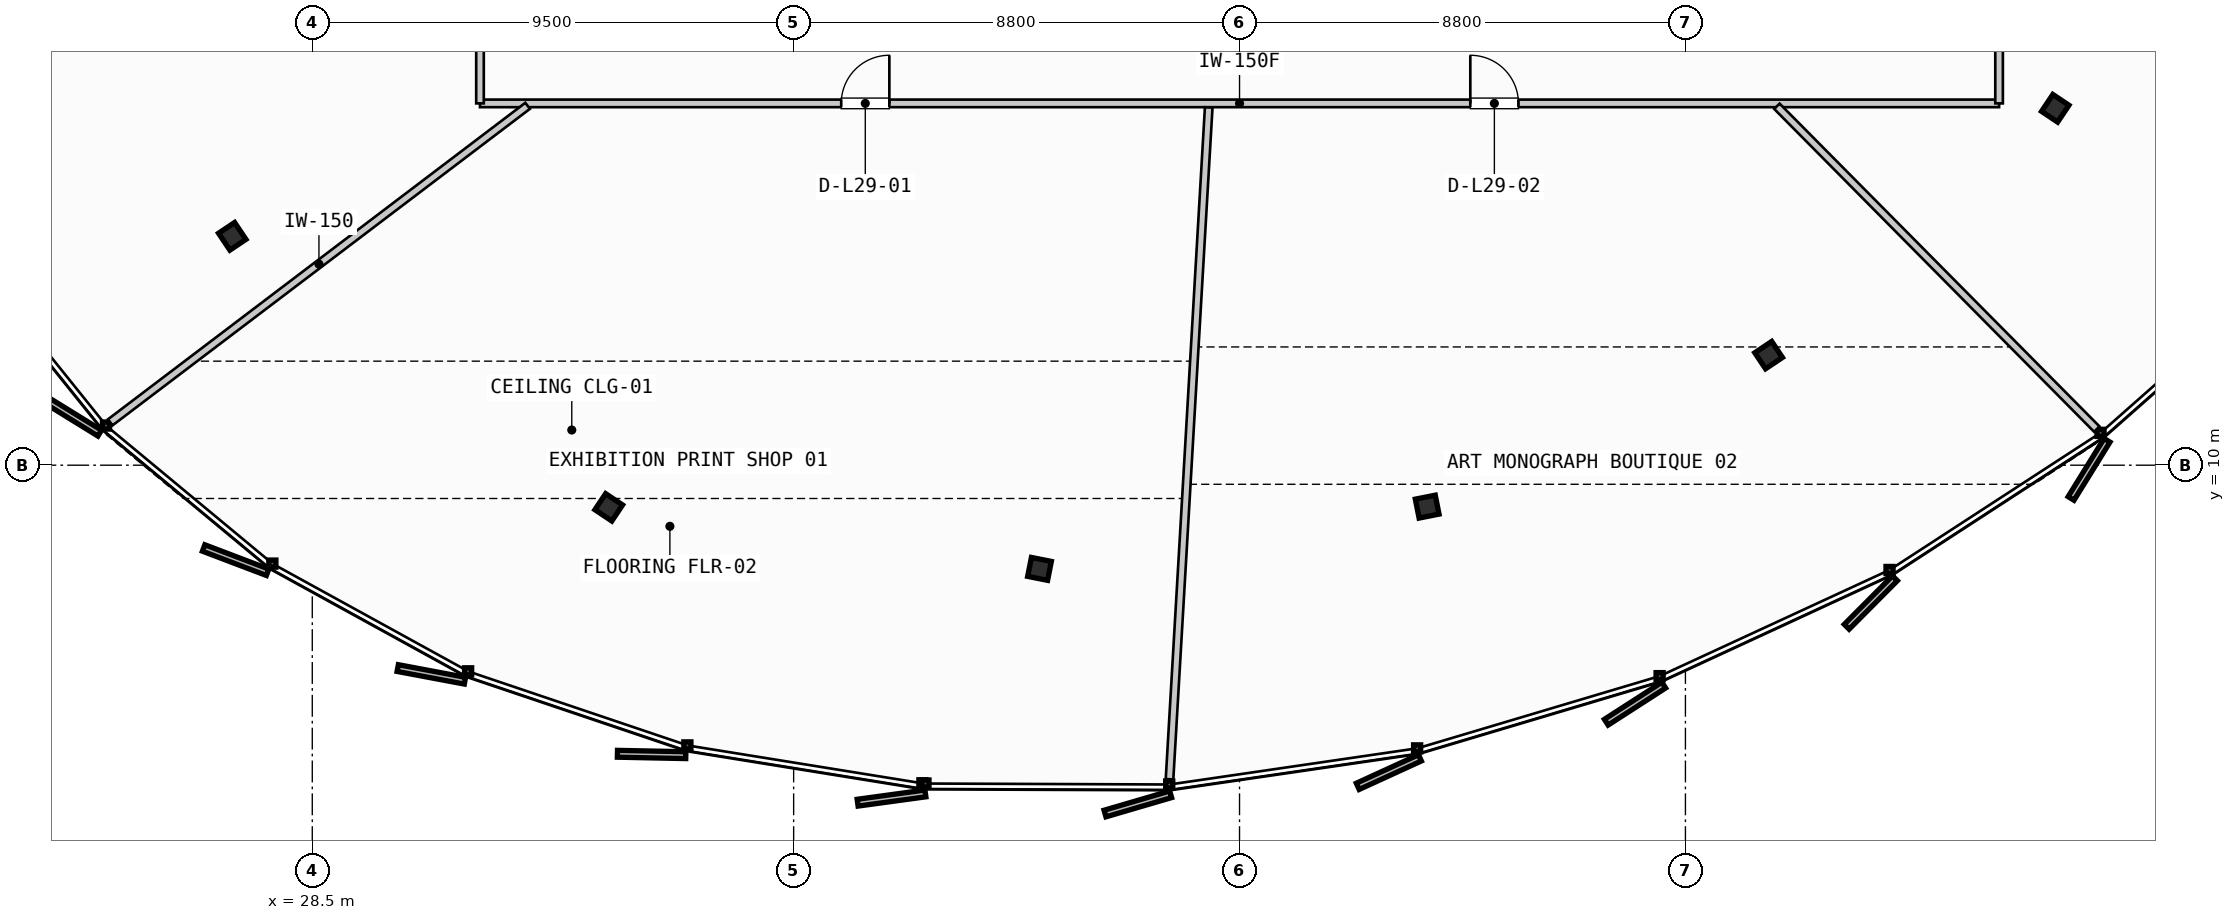
"""IFC4 building model, lengths in metres.
Left out: names, types, materials, properties, quantities, classifications, styles, units other than length and angle.
Written with IfcOpenShell. Run it as: python <this file> out.ifc"""

import sys

from ifc_helpers import new_model, si_unit, direction, frame, frame_2d, origin, origin_2d, place, context, subcontext, project, spatial, rectangle, i_section, extrude, source, transform, mapped, element, fill, save


model = new_model("IFC4")
c1 = context("Model", 3, precision=1e-05, world=origin(), true_north=direction((0.0, 1.0)))
c2 = subcontext(c1, "Body", "Model", "MODEL_VIEW")
j1 = project(units=[si_unit("LENGTHUNIT", "METRE"), si_unit("PLANEANGLEUNIT", "RADIAN")], contexts=[c1])
p1 = place(None, origin())
s1 = spatial("IfcSite", under=j1, at=p1, CompositionType="ELEMENT")
p2 = place(p1, origin())
s2 = spatial("IfcBuilding", under=s1, at=p2, CompositionType="ELEMENT")
p3 = place(p2, frame((0.0, 0.0, 118.0)))
s3 = spatial("IfcBuildingStorey", under=s2, at=p3, CompositionType="ELEMENT", Elevation=118.0)
m1 = source(origin(), c2, "Body", "SweptSolid", [
    extrude(i_section(OverallWidth=0.401, OverallDepth=0.381, WebThickness=0.032, FlangeThickness=0.051, FilletRadius=0.015, at=origin_2d()), origin(), (0.0, 0.0, 1.0), 3.35),
])
for number, where, z_axis, x_axis in (
    (1, (26.921, 14.517, 0.0), (0.0, 0.0, 1.0), (-0.831, -0.556, 0.0)),
    (2, (34.351, 9.168, 0.0), (0.0, 0.0, 1.0), (-0.556, -0.831, 0.0)),
    (3, (42.852, 7.954, 0.0), (0.0, 0.0, 1.0), (-0.195, -0.981, 0.0)),
    (4, (50.503, 9.182, 0.0), (0.0, 0.0, 1.0), (0.195, -0.981, 0.0)),
    (5, (57.242, 12.172, 0.0), (0.0, 0.0, 1.0), (0.556, -0.831, 0.0)),
    (6, (62.899, 17.043, 0.0), (0.0, 0.0, 1.0), (0.831, -0.556, 0.0)),
):
    element("IfcColumn", number, at=place(p3, frame(where, z_axis=z_axis, x_axis=x_axis)), inside=s3, PredefinedType="COLUMN", context=c2, shape_type="MappedRepresentation", body=[
        mapped(m1, transform((0.0, 0.0, 0.0), scale=1.0)),
    ])
p4 = place(p3, frame((31.81, 17.14, 0.0), z_axis=(0.0, 0.0, 1.0), x_axis=(1.0, 0.0, 0.0)))
e7 = element("IfcWall", 7, at=p4, inside=s3, PredefinedType="PARTITIONING", context=c2, shape_type="SweptSolid", body=[
    extrude(rectangle(XDim=29.98, YDim=0.15, at=frame_2d((14.99, 0.0))), origin(), (0.0, 0.0, 1.0), 2.775),
])
p5 = place(p4, frame((7.129, 0.0, 0.0)))
e8 = element("IfcOpeningElement", 8, at=p5, cuts=e7, PredefinedType="OPENING", context=c2, shape_type="SweptSolid", body=[
    extrude(rectangle(XDim=0.95, YDim=2.15, at=frame_2d((0.475, 1.075))), frame((0.0, 0.085, 0.0), z_axis=(0.0, -1.0, 0.0), x_axis=(1.0, 0.0, 0.0)), (0.0, 0.0, 1.0), 0.17),
])
p6 = place(p4, frame((19.544, 0.0, 0.0)))
e9 = element("IfcOpeningElement", 9, at=p6, cuts=e7, PredefinedType="OPENING", context=c2, shape_type="SweptSolid", body=[
    extrude(rectangle(XDim=0.95, YDim=2.15, at=frame_2d((0.475, 1.075))), frame((0.0, 0.085, 0.0), z_axis=(0.0, -1.0, 0.0), x_axis=(1.0, 0.0, 0.0)), (0.0, 0.0, 1.0), 0.17),
])
p7 = place(p3, frame((61.79, 17.14, 0.0), z_axis=(0.0, 0.0, 1.0), x_axis=(0.0, 1.0, 0.0)))
e10 = element("IfcWall", 10, at=p7, inside=s3, PredefinedType="PARTITIONING", context=c2, shape_type="SweptSolid", body=[
    extrude(rectangle(XDim=21.32, YDim=0.15, at=frame_2d((10.66, 0.0))), origin(), (0.0, 0.0, 1.0), 2.775),
])
p8 = place(p7, frame((4.571, 0.0, 0.0)))
e11 = element("IfcOpeningElement", 11, at=p8, cuts=e10, PredefinedType="OPENING", context=c2, shape_type="SweptSolid", body=[
    extrude(rectangle(XDim=0.95, YDim=2.15, at=frame_2d((0.475, 1.075))), frame((0.0, 0.085, 0.0), z_axis=(0.0, -1.0, 0.0), x_axis=(1.0, 0.0, 0.0)), (0.0, 0.0, 1.0), 0.17),
])
p9 = place(p7, frame((14.65, 0.0, 0.0)))
e12 = element("IfcOpeningElement", 12, at=p9, cuts=e10, PredefinedType="OPENING", context=c2, shape_type="SweptSolid", body=[
    extrude(rectangle(XDim=0.95, YDim=2.15, at=frame_2d((0.475, 1.075))), frame((0.0, 0.085, 0.0), z_axis=(0.0, -1.0, 0.0), x_axis=(1.0, 0.0, 0.0)), (0.0, 0.0, 1.0), 0.17),
])
p10 = place(p3, frame((31.81, 38.46, 0.0), z_axis=(0.0, 0.0, 1.0), x_axis=(0.0, -1.0, 0.0)))
e13 = element("IfcWall", 13, at=p10, inside=s3, PredefinedType="PARTITIONING", context=c2, shape_type="SweptSolid", body=[
    extrude(rectangle(XDim=21.32, YDim=0.15, at=frame_2d((10.66, 0.0))), origin(), (0.0, 0.0, 1.0), 2.775),
])
p11 = place(p10, frame((4.538, 0.0, 0.0)))
e14 = element("IfcOpeningElement", 14, at=p11, cuts=e13, PredefinedType="OPENING", context=c2, shape_type="SweptSolid", body=[
    extrude(rectangle(XDim=0.95, YDim=2.15, at=frame_2d((0.475, 1.075))), frame((0.0, 0.085, 0.0), z_axis=(0.0, -1.0, 0.0), x_axis=(1.0, 0.0, 0.0)), (0.0, 0.0, 1.0), 0.17),
])
p12 = place(p10, frame((14.618, 0.0, 0.0)))
e15 = element("IfcOpeningElement", 15, at=p12, cuts=e13, PredefinedType="OPENING", context=c2, shape_type="SweptSolid", body=[
    extrude(rectangle(XDim=0.95, YDim=2.15, at=frame_2d((0.475, 1.075))), frame((0.0, 0.085, 0.0), z_axis=(0.0, -1.0, 0.0), x_axis=(1.0, 0.0, 0.0)), (0.0, 0.0, 1.0), 0.17),
])
p13 = place(p3, frame((32.75, 17.092, 0.0), z_axis=(0.0, 0.0, 1.0), x_axis=(-0.7968202688, -0.604216400993, 0.0)))
e16 = element("IfcWall", 16, at=p13, inside=s3, PredefinedType="PARTITIONING", context=c2, shape_type="SweptSolid", body=[
    extrude(rectangle(XDim=10.337, YDim=0.15, at=frame_2d((5.168, 0.0))), origin(), (0.0, 0.0, 1.0), 2.775),
])
p14 = place(p3, frame((46.192, 17.06, 0.0), z_axis=(0.0, 0.0, 1.0), x_axis=(-0.058241361623, -0.998302531198, 0.0)))
e17 = element("IfcWall", 17, at=p14, inside=s3, PredefinedType="PARTITIONING", context=c2, shape_type="SweptSolid", body=[
    extrude(rectangle(XDim=13.28, YDim=0.15, at=frame_2d((6.64, 0.0))), origin(), (0.0, 0.0, 1.0), 2.775),
])
p15 = place(p3, frame((57.405, 17.083, 0.0), z_axis=(0.0, 0.0, 1.0), x_axis=(0.703901110521, -0.710297984375, 0.0)))
e18 = element("IfcWall", 18, at=p15, inside=s3, PredefinedType="PARTITIONING", context=c2, shape_type="SweptSolid", body=[
    extrude(rectangle(XDim=8.969, YDim=0.15, at=frame_2d((4.484, 0.0))), origin(), (0.0, 0.0, 1.0), 2.775),
])
m2 = source(origin(), c2, "Body", "SweptSolid", [
    extrude(rectangle(XDim=0.95, YDim=2.15, at=frame_2d((0.475, 1.075))), frame((0.0, 0.025, 0.0), z_axis=(0.0, -1.0, 0.0), x_axis=(1.0, 0.0, 0.0)), (0.0, 0.0, 1.0), 0.05),
])
p16 = place(p5, origin())
e19 = element("IfcDoor", 19, at=p16, inside=s3, OperationType="SINGLE_SWING_RIGHT", PredefinedType="DOOR", context=c2, shape_type="MappedRepresentation", body=[
    mapped(m2, transform((0.0, 0.0, 0.0), scale=1.0)),
])
fill(e8, e19)
p17 = place(p6, origin())
e20 = element("IfcDoor", 20, at=p17, inside=s3, OperationType="SINGLE_SWING_LEFT", PredefinedType="DOOR", context=c2, shape_type="MappedRepresentation", body=[
    mapped(m2, transform((0.0, 0.0, 0.0), scale=1.0)),
])
fill(e9, e20)
save(model, sys.argv[1])
